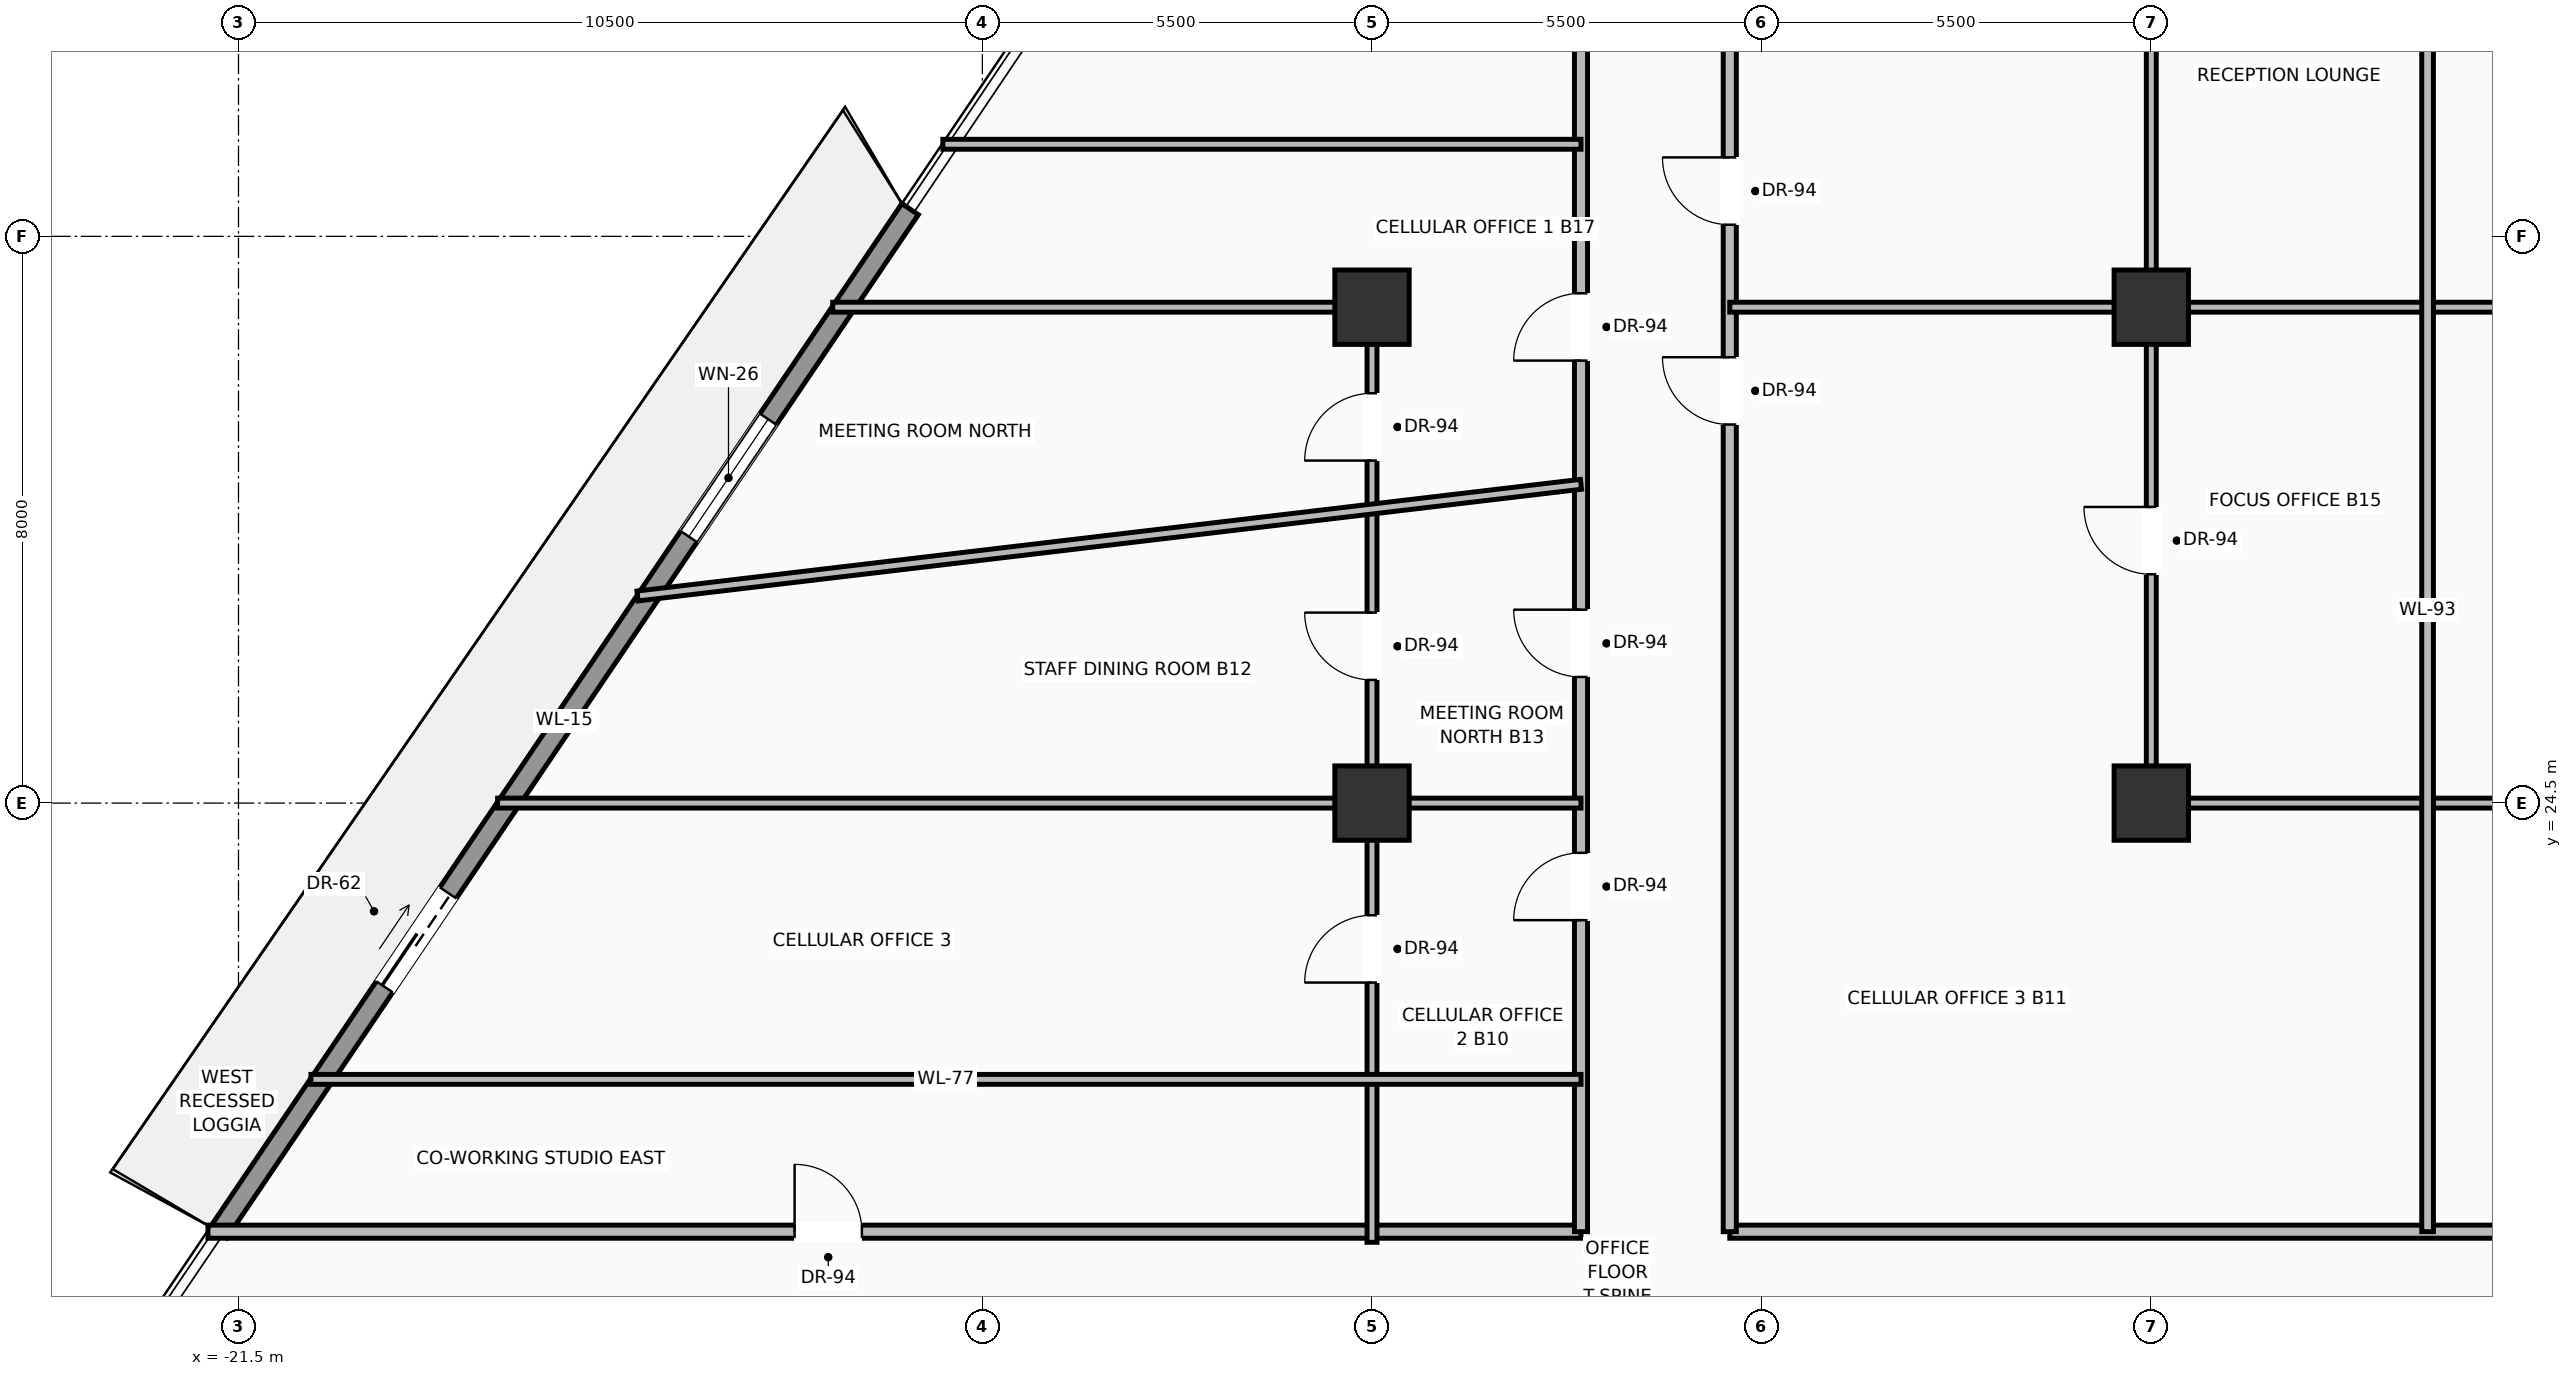
"""IFC4 building model, lengths in metres.
Left out: names, types, materials, properties, quantities, classifications, styles, units other than length and angle.
Written with IfcOpenShell. Run it as: python <this file> out.ifc"""

import sys

from ifc_helpers import new_model, si_unit, direction, frame, frame_2d, origin, origin_2d, place, context, subcontext, project, spatial, rectangle, extrude, source, transform, mapped, element, fill, save


model = new_model("IFC4")
c1 = context("Model", 3, precision=1e-05, world=origin(), true_north=direction((0.0, 1.0)))
c2 = subcontext(c1, "Body", "Model", "MODEL_VIEW")
j1 = project(units=[si_unit("LENGTHUNIT", "METRE"), si_unit("PLANEANGLEUNIT", "RADIAN")], contexts=[c1])
p1 = place(None, origin())
s1 = spatial("IfcSite", under=j1, at=p1, CompositionType="ELEMENT")
p2 = place(p1, origin())
s2 = spatial("IfcBuilding", under=s1, at=p2, CompositionType="ELEMENT")
p3 = place(p2, frame((0.0, 0.0, 84.0)))
s3 = spatial("IfcBuildingStorey", under=s2, at=p3, CompositionType="ELEMENT", Elevation=84.0)
m1 = source(origin(), c2, "Body", "SweptSolid", [
    extrude(rectangle(XDim=1.05, YDim=1.05, at=origin_2d()), origin(), (0.0, 0.0, 1.0), 3.7),
])
for number, where, z_axis, x_axis in (
    (1, (-5.5, 24.5, 0.0), (0.0, 0.0, 1.0), (1.0, 0.0, 0.0)),
    (2, (5.5, 24.5, 0.0), (0.0, 0.0, 1.0), (1.0, 0.0, 0.0)),
    (3, (-5.5, 31.5, 0.0), (0.0, 0.0, 1.0), (1.0, 0.0, 0.0)),
    (4, (5.5, 31.5, 0.0), (0.0, 0.0, 1.0), (1.0, 0.0, 0.0)),
):
    element("IfcColumn", number, at=place(p3, frame(where, z_axis=z_axis, x_axis=x_axis)), inside=s3, PredefinedType="COLUMN", context=c2, shape_type="MappedRepresentation", body=[
        mapped(m1, transform((0.0, 0.0, 0.0), scale=1.0)),
    ])
p4 = place(p3, frame((-21.781, 18.44, 0.0), z_axis=(0.0, 0.0, 1.0), x_axis=(0.559902105929, 0.828558767847, 0.0)))
e5 = element("IfcWall", 5, at=p4, inside=s3, PredefinedType="SOLIDWALL", context=c2, shape_type="SweptSolid", body=[
    extrude(rectangle(XDim=17.433, YDim=0.28, at=frame_2d((8.717, 0.0))), origin(), (0.0, 0.0, 1.0), 3.03),
])
p5 = place(p4, frame((4.184, 0.0, 0.0)))
e6 = element("IfcOpeningElement", 6, at=p5, cuts=e5, PredefinedType="OPENING", context=c2, shape_type="SweptSolid", body=[
    extrude(rectangle(XDim=1.6, YDim=2.35, at=frame_2d((0.8, 1.175))), frame((0.0, 0.15, 0.0), z_axis=(0.0, -1.0, 0.0), x_axis=(1.0, 0.0, 0.0)), (0.0, 0.0, 1.0), 0.3),
])
p6 = place(p4, frame((11.855, 0.0, 0.9)))
e7 = element("IfcOpeningElement", 7, at=p6, cuts=e5, PredefinedType="OPENING", context=c2, shape_type="SweptSolid", body=[
    extrude(rectangle(XDim=2.0, YDim=1.85, at=frame_2d((1.0, 0.925))), frame((0.0, 0.15, 0.0), z_axis=(0.0, -1.0, 0.0), x_axis=(1.0, 0.0, 0.0)), (0.0, 0.0, 1.0), 0.3),
])
p7 = place(p3, frame((-21.931, 18.45, 0.0), z_axis=(0.0, 0.0, 1.0), x_axis=(1.0, 0.0, 0.0)))
e8 = element("IfcWall", 8, at=p7, inside=s3, PredefinedType="PARTITIONING", context=c2, shape_type="SweptSolid", body=[
    extrude(rectangle(XDim=19.381, YDim=0.185, at=frame_2d((9.69, 0.0))), origin(), (0.0, 0.0, 1.0), 2.747),
])
p8 = place(p7, frame((8.281, 0.0, 0.0)))
e9 = element("IfcOpeningElement", 9, at=p8, cuts=e8, PredefinedType="OPENING", context=c2, shape_type="SweptSolid", body=[
    extrude(rectangle(XDim=0.95, YDim=2.2, at=frame_2d((0.475, 1.1))), frame((0.0, 0.103, 0.0), z_axis=(0.0, -1.0, 0.0), x_axis=(1.0, 0.0, 0.0)), (0.0, 0.0, 1.0), 0.205),
])
p9 = place(p3, frame((-0.45, 18.45, 0.0), z_axis=(0.0, 0.0, 1.0), x_axis=(1.0, 0.0, 0.0)))
e10 = element("IfcWall", 10, at=p9, inside=s3, PredefinedType="PARTITIONING", context=c2, shape_type="SweptSolid", body=[
    extrude(rectangle(XDim=22.827, YDim=0.185, at=frame_2d((11.413, 0.0))), origin(), (0.0, 0.0, 1.0), 2.747),
])
p10 = place(p9, frame((12.046, 0.0, 0.0)))
e11 = element("IfcOpeningElement", 11, at=p10, cuts=e10, PredefinedType="OPENING", context=c2, shape_type="SweptSolid", body=[
    extrude(rectangle(XDim=0.95, YDim=2.2, at=frame_2d((0.475, 1.1))), frame((0.0, 0.103, 0.0), z_axis=(0.0, -1.0, 0.0), x_axis=(1.0, 0.0, 0.0)), (0.0, 0.0, 1.0), 0.205),
])
p11 = place(p3, frame((-2.55, 18.45, 0.0), z_axis=(0.0, 0.0, 1.0), x_axis=(0.0, 1.0, 0.0)))
e12 = element("IfcWall", 12, at=p11, inside=s3, PredefinedType="PARTITIONING", context=c2, shape_type="SweptSolid", body=[
    extrude(rectangle(XDim=17.15, YDim=0.185, at=frame_2d((8.575, 0.0))), origin(), (0.0, 0.0, 1.0), 2.747),
])
p12 = place(p11, frame((4.397, 0.0, 0.0)))
e13 = element("IfcOpeningElement", 13, at=p12, cuts=e12, PredefinedType="OPENING", context=c2, shape_type="SweptSolid", body=[
    extrude(rectangle(XDim=0.95, YDim=2.2, at=frame_2d((0.475, 1.1))), frame((0.0, 0.103, 0.0), z_axis=(0.0, -1.0, 0.0), x_axis=(1.0, 0.0, 0.0)), (0.0, 0.0, 1.0), 0.205),
])
p13 = place(p11, frame((7.83, 0.0, 0.0)))
e14 = element("IfcOpeningElement", 14, at=p13, cuts=e12, PredefinedType="OPENING", context=c2, shape_type="SweptSolid", body=[
    extrude(rectangle(XDim=0.95, YDim=2.2, at=frame_2d((0.475, 1.1))), frame((0.0, 0.103, 0.0), z_axis=(0.0, -1.0, 0.0), x_axis=(1.0, 0.0, 0.0)), (0.0, 0.0, 1.0), 0.205),
])
p14 = place(p11, frame((12.296, 0.0, 0.0)))
e15 = element("IfcOpeningElement", 15, at=p14, cuts=e12, PredefinedType="OPENING", context=c2, shape_type="SweptSolid", body=[
    extrude(rectangle(XDim=0.95, YDim=2.2, at=frame_2d((0.475, 1.1))), frame((0.0, 0.103, 0.0), z_axis=(0.0, -1.0, 0.0), x_axis=(1.0, 0.0, 0.0)), (0.0, 0.0, 1.0), 0.205),
])
p15 = place(p3, frame((-0.45, 18.45, 0.0), z_axis=(0.0, 0.0, 1.0), x_axis=(0.0, 1.0, 0.0)))
e16 = element("IfcWall", 16, at=p15, inside=s3, PredefinedType="PARTITIONING", context=c2, shape_type="SweptSolid", body=[
    extrude(rectangle(XDim=17.15, YDim=0.185, at=frame_2d((8.575, 0.0))), origin(), (0.0, 0.0, 1.0), 2.747),
])
p16 = place(p15, frame((11.394, 0.0, 0.0)))
e17 = element("IfcOpeningElement", 17, at=p16, cuts=e16, PredefinedType="OPENING", context=c2, shape_type="SweptSolid", body=[
    extrude(rectangle(XDim=0.95, YDim=2.2, at=frame_2d((0.475, 1.1))), frame((0.0, 0.103, 0.0), z_axis=(0.0, -1.0, 0.0), x_axis=(1.0, 0.0, 0.0)), (0.0, 0.0, 1.0), 0.205),
])
p17 = place(p15, frame((14.214, 0.0, 0.0)))
e18 = element("IfcOpeningElement", 18, at=p17, cuts=e16, PredefinedType="OPENING", context=c2, shape_type="SweptSolid", body=[
    extrude(rectangle(XDim=0.95, YDim=2.2, at=frame_2d((0.475, 1.1))), frame((0.0, 0.103, 0.0), z_axis=(0.0, -1.0, 0.0), x_axis=(1.0, 0.0, 0.0)), (0.0, 0.0, 1.0), 0.205),
])
p18 = place(p3, frame((-5.5, 18.3, 0.0), z_axis=(0.0, 0.0, 1.0), x_axis=(0.0, 1.0, 0.0)))
e19 = element("IfcWall", 19, at=p18, inside=s3, PredefinedType="PARTITIONING", context=c2, shape_type="SweptSolid", body=[
    extrude(rectangle(XDim=13.2, YDim=0.14, at=frame_2d((6.6, 0.0))), origin(), (0.0, 0.0, 1.0), 2.747),
])
p19 = place(p18, frame((3.667, 0.0, 0.0)))
e20 = element("IfcOpeningElement", 20, at=p19, cuts=e19, PredefinedType="OPENING", context=c2, shape_type="SweptSolid", body=[
    extrude(rectangle(XDim=0.95, YDim=2.2, at=frame_2d((0.475, 1.1))), frame((0.0, 0.08, 0.0), z_axis=(0.0, -1.0, 0.0), x_axis=(1.0, 0.0, 0.0)), (0.0, 0.0, 1.0), 0.16),
])
p20 = place(p18, frame((7.939, 0.0, 0.0)))
e21 = element("IfcOpeningElement", 21, at=p20, cuts=e19, PredefinedType="OPENING", context=c2, shape_type="SweptSolid", body=[
    extrude(rectangle(XDim=0.95, YDim=2.2, at=frame_2d((0.475, 1.1))), frame((0.0, 0.08, 0.0), z_axis=(0.0, -1.0, 0.0), x_axis=(1.0, 0.0, 0.0)), (0.0, 0.0, 1.0), 0.16),
])
p21 = place(p18, frame((11.035, 0.0, 0.0)))
e22 = element("IfcOpeningElement", 22, at=p21, cuts=e19, PredefinedType="OPENING", context=c2, shape_type="SweptSolid", body=[
    extrude(rectangle(XDim=0.95, YDim=2.2, at=frame_2d((0.475, 1.1))), frame((0.0, 0.08, 0.0), z_axis=(0.0, -1.0, 0.0), x_axis=(1.0, 0.0, 0.0)), (0.0, 0.0, 1.0), 0.16),
])
p22 = place(p3, frame((5.5, 24.5, 0.0), z_axis=(0.0, 0.0, 1.0), x_axis=(0.0, 1.0, 0.0)))
e23 = element("IfcWall", 23, at=p22, inside=s3, PredefinedType="PARTITIONING", context=c2, shape_type="SweptSolid", body=[
    extrude(rectangle(XDim=17.645, YDim=0.14, at=frame_2d((8.822, 0.0))), origin(), (0.0, 0.0, 1.0), 2.747),
])
p23 = place(p22, frame((3.23, 0.0, 0.0)))
e24 = element("IfcOpeningElement", 24, at=p23, cuts=e23, PredefinedType="OPENING", context=c2, shape_type="SweptSolid", body=[
    extrude(rectangle(XDim=0.95, YDim=2.2, at=frame_2d((0.475, 1.1))), frame((0.0, 0.08, 0.0), z_axis=(0.0, -1.0, 0.0), x_axis=(1.0, 0.0, 0.0)), (0.0, 0.0, 1.0), 0.16),
])
p24 = place(p22, frame((11.812, 0.0, 0.0)))
e25 = element("IfcOpeningElement", 25, at=p24, cuts=e23, PredefinedType="OPENING", context=c2, shape_type="SweptSolid", body=[
    extrude(rectangle(XDim=0.95, YDim=2.2, at=frame_2d((0.475, 1.1))), frame((0.0, 0.08, 0.0), z_axis=(0.0, -1.0, 0.0), x_axis=(1.0, 0.0, 0.0)), (0.0, 0.0, 1.0), 0.16),
])
p25 = place(p3, frame((-13.112, 31.5, 0.0), z_axis=(0.0, 0.0, 1.0), x_axis=(1.0, 0.0, 0.0)))
e26 = element("IfcWall", 26, at=p25, inside=s3, PredefinedType="PARTITIONING", context=c2, shape_type="SweptSolid", body=[
    extrude(rectangle(XDim=7.612, YDim=0.14, at=frame_2d((3.806, 0.0))), origin(), (0.0, 0.0, 1.0), 2.747),
])
p26 = place(p3, frame((5.5, 24.5, 0.0), z_axis=(0.0, 0.0, 1.0), x_axis=(1.0, 0.0, 0.0)))
e27 = element("IfcWall", 27, at=p26, inside=s3, PredefinedType="PARTITIONING", context=c2, shape_type="SweptSolid", body=[
    extrude(rectangle(XDim=12.935, YDim=0.14, at=frame_2d((6.467, 0.0))), origin(), (0.0, 0.0, 1.0), 2.747),
])
p27 = place(p26, frame((7.706, 0.0, 0.0)))
e28 = element("IfcOpeningElement", 28, at=p27, cuts=e27, PredefinedType="OPENING", context=c2, shape_type="SweptSolid", body=[
    extrude(rectangle(XDim=0.95, YDim=2.2, at=frame_2d((0.475, 1.1))), frame((0.0, 0.08, 0.0), z_axis=(0.0, -1.0, 0.0), x_axis=(1.0, 0.0, 0.0)), (0.0, 0.0, 1.0), 0.16),
])
p28 = place(p3, frame((-20.478, 20.6, 0.0), z_axis=(0.0, 0.0, 1.0), x_axis=(1.0, 0.0, 0.0)))
e29 = element("IfcWall", 29, at=p28, inside=s3, PredefinedType="PARTITIONING", context=c2, shape_type="SweptSolid", body=[
    extrude(rectangle(XDim=17.928, YDim=0.14, at=frame_2d((8.964, 0.0))), origin(), (0.0, 0.0, 1.0), 2.747),
])
p29 = place(p3, frame((-17.843, 24.5, 0.0), z_axis=(0.0, 0.0, 1.0), x_axis=(1.0, 0.0, 0.0)))
e30 = element("IfcWall", 30, at=p29, inside=s3, PredefinedType="PARTITIONING", context=c2, shape_type="SweptSolid", body=[
    extrude(rectangle(XDim=15.292, YDim=0.14, at=frame_2d((7.646, 0.0))), origin(), (0.0, 0.0, 1.0), 2.747),
])
p30 = place(p3, frame((-15.867, 27.423, 0.0), z_axis=(0.0, 0.0, 1.0), x_axis=(0.993064088307, 0.117574302099, 0.0)))
e31 = element("IfcWall", 31, at=p30, inside=s3, PredefinedType="PARTITIONING", context=c2, shape_type="SweptSolid", body=[
    extrude(rectangle(XDim=13.41, YDim=0.14, at=frame_2d((6.705, 0.0))), origin(), (0.0, 0.0, 1.0), 2.747),
])
p31 = place(p3, frame((-11.558, 33.8, 0.0), z_axis=(0.0, 0.0, 1.0), x_axis=(1.0, 0.0, 0.0)))
e32 = element("IfcWall", 32, at=p31, inside=s3, PredefinedType="PARTITIONING", context=c2, shape_type="SweptSolid", body=[
    extrude(rectangle(XDim=9.008, YDim=0.14, at=frame_2d((4.504, 0.0))), origin(), (0.0, 0.0, 1.0), 2.747),
])
p32 = place(p3, frame((-0.45, 31.5, 0.0), z_axis=(0.0, 0.0, 1.0), x_axis=(1.0, 0.0, 0.0)))
e33 = element("IfcWall", 33, at=p32, inside=s3, PredefinedType="PARTITIONING", context=c2, shape_type="SweptSolid", body=[
    extrude(rectangle(XDim=14.323, YDim=0.14, at=frame_2d((7.162, 0.0))), origin(), (0.0, 0.0, 1.0), 2.747),
])
p33 = place(p3, frame((9.4, 18.45, 0.0), z_axis=(0.0, 0.0, 1.0), x_axis=(0.0, 1.0, 0.0)))
e34 = element("IfcWall", 34, at=p33, inside=s3, PredefinedType="PARTITIONING", context=c2, shape_type="SweptSolid", body=[
    extrude(rectangle(XDim=17.55, YDim=0.165, at=frame_2d((8.775, 0.0))), origin(), (0.0, 0.0, 1.0), 2.747),
])
m2 = source(origin(), c2, "Body", "SweptSolid", [
    extrude(rectangle(XDim=1.6, YDim=2.35, at=frame_2d((0.8, 1.175))), frame((0.0, 0.025, 0.0), z_axis=(0.0, -1.0, 0.0), x_axis=(1.0, 0.0, 0.0)), (0.0, 0.0, 1.0), 0.05),
])
p34 = place(p5, origin())
e35 = element("IfcDoor", 35, at=p34, inside=s3, OperationType="SLIDING_TO_LEFT", PredefinedType="DOOR", context=c2, shape_type="MappedRepresentation", body=[
    mapped(m2, transform((0.0, 0.0, 0.0), scale=1.0)),
])
fill(e6, e35)
m3 = source(origin(), c2, "Body", "SweptSolid", [
    extrude(rectangle(XDim=2.0, YDim=1.85, at=frame_2d((1.0, 0.925))), frame((0.0, 0.03, 0.0), z_axis=(0.0, -1.0, 0.0), x_axis=(1.0, 0.0, 0.0)), (0.0, 0.0, 1.0), 0.06),
])
p35 = place(p6, origin())
e36 = element("IfcWindow", 36, at=p35, inside=s3, PartitioningType="SINGLE_PANEL", PredefinedType="WINDOW", context=c2, shape_type="MappedRepresentation", body=[
    mapped(m3, transform((0.0, 0.0, 0.0), scale=1.0)),
])
fill(e7, e36)
m4 = source(origin(), c2, "Body", "SweptSolid", [
    extrude(rectangle(XDim=0.95, YDim=2.2, at=frame_2d((0.475, 1.1))), frame((0.0, 0.025, 0.0), z_axis=(0.0, -1.0, 0.0), x_axis=(1.0, 0.0, 0.0)), (0.0, 0.0, 1.0), 0.05),
])
p36 = place(p8, origin())
e37 = element("IfcDoor", 37, at=p36, inside=s3, OperationType="SINGLE_SWING_LEFT", PredefinedType="DOOR", context=c2, shape_type="MappedRepresentation", body=[
    mapped(m4, transform((0.0, 0.0, 0.0), scale=1.0)),
])
fill(e9, e37)
p37 = place(p12, origin())
e38 = element("IfcDoor", 38, at=p37, inside=s3, OperationType="SINGLE_SWING_LEFT", PredefinedType="DOOR", context=c2, shape_type="MappedRepresentation", body=[
    mapped(m4, transform((0.0, 0.0, 0.0), scale=1.0)),
])
fill(e13, e38)
p38 = place(p16, origin())
e39 = element("IfcDoor", 39, at=p38, inside=s3, OperationType="SINGLE_SWING_RIGHT", PredefinedType="DOOR", context=c2, shape_type="MappedRepresentation", body=[
    mapped(m4, transform((0.0, 0.0, 0.0), scale=1.0)),
])
fill(e17, e39)
p39 = place(p19, origin())
e40 = element("IfcDoor", 40, at=p39, inside=s3, OperationType="SINGLE_SWING_LEFT", PredefinedType="DOOR", context=c2, shape_type="MappedRepresentation", body=[
    mapped(m4, transform((0.0, 0.0, 0.0), scale=1.0)),
])
fill(e20, e40)
p40 = place(p13, origin())
e41 = element("IfcDoor", 41, at=p40, inside=s3, OperationType="SINGLE_SWING_RIGHT", PredefinedType="DOOR", context=c2, shape_type="MappedRepresentation", body=[
    mapped(m4, transform((0.0, 0.0, 0.0), scale=1.0)),
])
fill(e14, e41)
p41 = place(p23, origin())
e42 = element("IfcDoor", 42, at=p41, inside=s3, OperationType="SINGLE_SWING_RIGHT", PredefinedType="DOOR", context=c2, shape_type="MappedRepresentation", body=[
    mapped(m4, transform((0.0, 0.0, 0.0), scale=1.0)),
])
fill(e24, e42)
p42 = place(p14, origin())
e43 = element("IfcDoor", 43, at=p42, inside=s3, OperationType="SINGLE_SWING_LEFT", PredefinedType="DOOR", context=c2, shape_type="MappedRepresentation", body=[
    mapped(m4, transform((0.0, 0.0, 0.0), scale=1.0)),
])
fill(e15, e43)
p43 = place(p17, origin())
e44 = element("IfcDoor", 44, at=p43, inside=s3, OperationType="SINGLE_SWING_RIGHT", PredefinedType="DOOR", context=c2, shape_type="MappedRepresentation", body=[
    mapped(m4, transform((0.0, 0.0, 0.0), scale=1.0)),
])
fill(e18, e44)
p44 = place(p20, origin())
e45 = element("IfcDoor", 45, at=p44, inside=s3, OperationType="SINGLE_SWING_RIGHT", PredefinedType="DOOR", context=c2, shape_type="MappedRepresentation", body=[
    mapped(m4, transform((0.0, 0.0, 0.0), scale=1.0)),
])
fill(e21, e45)
p45 = place(p21, origin())
e46 = element("IfcDoor", 46, at=p45, inside=s3, OperationType="SINGLE_SWING_LEFT", PredefinedType="DOOR", context=c2, shape_type="MappedRepresentation", body=[
    mapped(m4, transform((0.0, 0.0, 0.0), scale=1.0)),
])
fill(e22, e46)
save(model, sys.argv[1])
